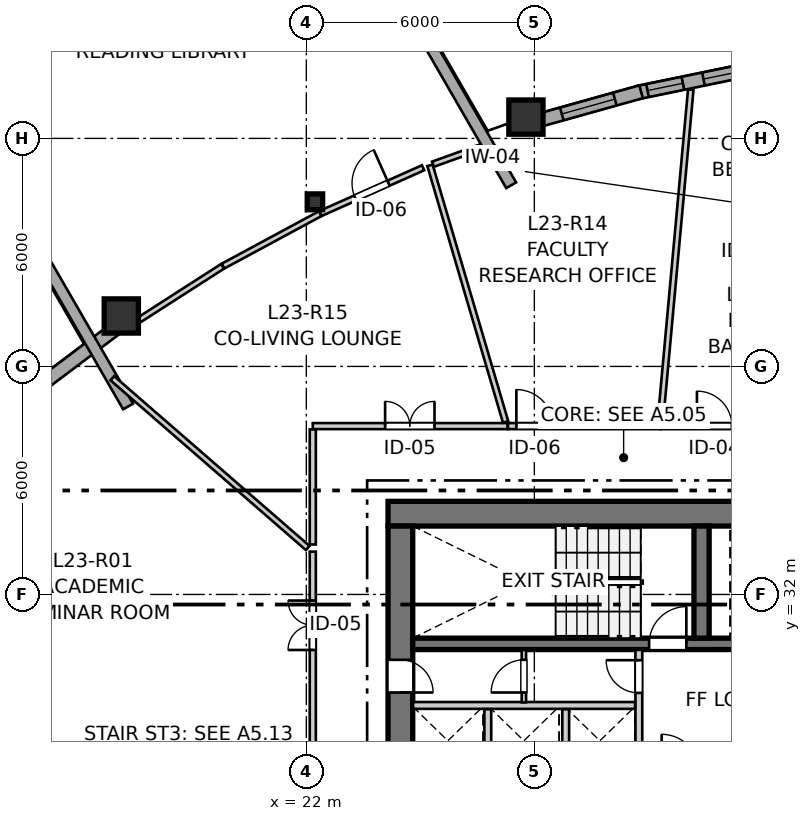
"""IFC4 building model, lengths in metres.
Left out: names, types, materials, properties, quantities, classifications, styles, units other than length and angle.
Written with IfcOpenShell. Run it as: python <this file> out.ifc"""

import sys

from ifc_helpers import new_model, si_unit, direction, frame, frame_2d, origin, origin_2d, place, context, subcontext, project, spatial, rectangle, i_section, extrude, source, transform, mapped, element, fill, save


model = new_model("IFC4")
c1 = context("Model", 3, precision=1e-05, world=origin(), true_north=direction((0.0, 1.0)))
c2 = subcontext(c1, "Body", "Model", "MODEL_VIEW")
j1 = project(units=[si_unit("LENGTHUNIT", "METRE"), si_unit("PLANEANGLEUNIT", "RADIAN")], contexts=[c1])
p1 = place(None, origin())
s1 = spatial("IfcSite", under=j1, at=p1, CompositionType="ELEMENT")
p2 = place(p1, origin())
s2 = spatial("IfcBuilding", under=s1, at=p2, CompositionType="ELEMENT")
p3 = place(p2, frame((0.0, 0.0, 80.0)))
s3 = spatial("IfcBuildingStorey", under=s2, at=p3, CompositionType="ELEMENT", Elevation=80.0)
p4 = place(p3, frame((36.55, 34.125, 0.0), z_axis=(0.0, 0.0, 1.0), x_axis=(-1.0, 0.0, 0.0)))
e1 = element("IfcWall", 1, at=p4, inside=s3, PredefinedType="SHEAR", context=c2, shape_type="SweptSolid", body=[
    extrude(rectangle(XDim=12.4, YDim=0.65, at=frame_2d((6.2, 0.0))), origin(), (0.0, 0.0, 1.0), 2.935),
])
p5 = place(p3, frame((24.475, 33.8, 0.0), z_axis=(0.0, 0.0, 1.0), x_axis=(0.0, -1.0, 0.0)))
e2 = element("IfcWall", 2, at=p5, inside=s3, PredefinedType="SHEAR", context=c2, shape_type="SweptSolid", body=[
    extrude(rectangle(XDim=15.6, YDim=0.65, at=frame_2d((7.8, 0.0))), origin(), (0.0, 0.0, 1.0), 2.935),
])
p6 = place(p5, frame((7.05, 0.0, 0.0)))
e3 = element("IfcOpeningElement", 3, at=p6, cuts=e2, PredefinedType="OPENING", context=c2, shape_type="SweptSolid", body=[
    extrude(rectangle(XDim=1.5, YDim=2.15, at=frame_2d((0.75, 1.075))), frame((0.0, 0.335, 0.0), z_axis=(0.0, -1.0, 0.0), x_axis=(1.0, 0.0, 0.0)), (0.0, 0.0, 1.0), 0.67),
])
p7 = place(p5, frame((3.52, 0.0, 0.0)))
e4 = element("IfcOpeningElement", 4, at=p7, cuts=e2, PredefinedType="OPENING", context=c2, shape_type="SweptSolid", body=[
    extrude(rectangle(XDim=0.86, YDim=2.05, at=frame_2d((0.43, 1.025))), frame((0.0, 0.335, 0.0), z_axis=(0.0, -1.0, 0.0), x_axis=(1.0, 0.0, 0.0)), (0.0, 0.0, 1.0), 0.67),
])
p8 = place(p5, frame((11.22, 0.0, 0.0)))
e5 = element("IfcOpeningElement", 5, at=p8, cuts=e2, PredefinedType="OPENING", context=c2, shape_type="SweptSolid", body=[
    extrude(rectangle(XDim=0.86, YDim=2.05, at=frame_2d((0.43, 1.025))), frame((0.0, 0.335, 0.0), z_axis=(0.0, -1.0, 0.0), x_axis=(1.0, 0.0, 0.0)), (0.0, 0.0, 1.0), 0.67),
])
p9 = place(p3, frame((24.8, 30.7, 0.0), z_axis=(0.0, 0.0, 1.0), x_axis=(1.0, 0.0, 0.0)))
e6 = element("IfcWall", 6, at=p9, inside=s3, PredefinedType="SHEAR", context=c2, shape_type="SweptSolid", body=[
    extrude(rectangle(XDim=11.1, YDim=0.3, at=frame_2d((5.55, 0.0))), origin(), (0.0, 0.0, 1.0), 2.935),
])
p10 = place(p9, frame((6.22, 0.0, 0.0)))
e7 = element("IfcOpeningElement", 7, at=p10, cuts=e6, PredefinedType="OPENING", context=c2, shape_type="SweptSolid", body=[
    extrude(rectangle(XDim=0.98, YDim=2.15, at=frame_2d((0.49, 1.075))), frame((0.0, 0.16, 0.0), z_axis=(0.0, -1.0, 0.0), x_axis=(1.0, 0.0, 0.0)), (0.0, 0.0, 1.0), 0.32),
])
p11 = place(p9, frame((9.15, 0.0, 0.0)))
e8 = element("IfcOpeningElement", 8, at=p11, cuts=e6, PredefinedType="OPENING", context=c2, shape_type="SweptSolid", body=[
    extrude(rectangle(XDim=1.15, YDim=2.15, at=frame_2d((0.575, 1.075))), frame((0.0, 0.16, 0.0), z_axis=(0.0, -1.0, 0.0), x_axis=(1.0, 0.0, 0.0)), (0.0, 0.0, 1.0), 0.32),
])
p12 = place(p3, frame((32.4, 30.85, 0.0), z_axis=(0.0, 0.0, 1.0), x_axis=(0.0, 1.0, 0.0)))
e9 = element("IfcWall", 9, at=p12, inside=s3, PredefinedType="SHEAR", context=c2, shape_type="SweptSolid", body=[
    extrude(rectangle(XDim=2.95, YDim=0.4, at=frame_2d((1.475, 0.0))), origin(), (0.0, 0.0, 1.0), 2.935),
])
m1 = source(origin(), c2, "Body", "SweptSolid", [
    extrude(rectangle(XDim=0.9, YDim=0.9, at=origin_2d()), origin(), (0.0, 0.0, 1.0), 2.935),
])
p13 = place(p3, frame((27.779, 44.561, 0.0), z_axis=(0.0, 0.0, 1.0), x_axis=(1.0, 0.0, 0.0)))
e10 = element("IfcColumn", 10, at=p13, inside=s3, PredefinedType="COLUMN", context=c2, shape_type="MappedRepresentation", body=[
    mapped(m1, transform((0.0, 0.0, 0.0), x_axis=(1.0, 0.0, 0.0), y_axis=(0.0, 1.0, 0.0), z_axis=(0.0, 0.0, 1.0), scale=1.0)),
])
m2 = source(origin(), c2, "Body", "SweptSolid", [
    extrude(i_section(OverallWidth=0.406, OverallDepth=0.416, WebThickness=0.027, FlangeThickness=0.044, FilletRadius=0.015, at=origin_2d()), origin(), (0.0, 0.0, 1.0), 2.935),
])
p14 = place(p3, frame((22.227, 42.331, 0.0), z_axis=(0.0, 0.0, 1.0), x_axis=(1.0, 0.0, 0.0)))
e11 = element("IfcColumn", 11, at=p14, inside=s3, PredefinedType="PILASTER", context=c2, shape_type="MappedRepresentation", body=[
    mapped(m2, transform((0.0, 0.0, 0.0), x_axis=(1.0, 0.0, 0.0), y_axis=(0.0, 1.0, 0.0), z_axis=(0.0, 0.0, 1.0), scale=1.0)),
])
p15 = place(p3, frame((17.131, 39.327, 0.0), z_axis=(0.0, 0.0, 1.0), x_axis=(1.0, 0.0, 0.0)))
e12 = element("IfcColumn", 12, at=p15, inside=s3, PredefinedType="COLUMN", context=c2, shape_type="MappedRepresentation", body=[
    mapped(m1, transform((0.0, 0.0, 0.0), x_axis=(1.0, 0.0, 0.0), y_axis=(0.0, 1.0, 0.0), z_axis=(0.0, 0.0, 1.0), scale=1.0)),
])
p16 = place(p3, frame((33.803, 45.84, 0.0), z_axis=(0.0, 0.0, 1.0), x_axis=(-0.97943222174, -0.201773444777, 0.0)))
e13 = element("IfcWall", 13, at=p16, inside=s3, PredefinedType="SOLIDWALL", context=c2, shape_type="SweptSolid", body=[
    extrude(rectangle(XDim=3.144, YDim=0.35, at=frame_2d((1.572, 0.0))), origin(), (0.0, 0.0, 1.0), 2.465),
])
p17 = place(p16, frame((0.431, 0.0, 0.82)))
e14 = element("IfcOpeningElement", 14, at=p17, cuts=e13, PredefinedType="OPENING", context=c2, shape_type="SweptSolid", body=[
    extrude(rectangle(XDim=0.95, YDim=1.35, at=frame_2d((0.475, 0.675))), frame((0.0, 0.185, 0.0), z_axis=(0.0, -1.0, 0.0), x_axis=(1.0, 0.0, 0.0)), (0.0, 0.0, 1.0), 0.37),
])
p18 = place(p16, frame((1.933, 0.0, 0.82)))
e15 = element("IfcOpeningElement", 15, at=p18, cuts=e13, PredefinedType="OPENING", context=c2, shape_type="SweptSolid", body=[
    extrude(rectangle(XDim=0.95, YDim=1.35, at=frame_2d((0.475, 0.675))), frame((0.0, 0.185, 0.0), z_axis=(0.0, -1.0, 0.0), x_axis=(1.0, 0.0, 0.0)), (0.0, 0.0, 1.0), 0.37),
])
p19 = place(p3, frame((30.809, 45.227, 0.0), z_axis=(0.0, 0.0, 1.0), x_axis=(-0.963041637143, -0.269352566591, 0.0)))
e16 = element("IfcWall", 16, at=p19, inside=s3, PredefinedType="SOLIDWALL", context=c2, shape_type="SweptSolid", body=[
    extrude(rectangle(XDim=2.873, YDim=0.35, at=frame_2d((1.437, 0.0))), origin(), (0.0, 0.0, 1.0), 2.465),
])
p20 = place(p19, frame((0.717, 0.0, 0.82)))
e17 = element("IfcOpeningElement", 17, at=p20, cuts=e16, PredefinedType="OPENING", context=c2, shape_type="SweptSolid", body=[
    extrude(rectangle(XDim=1.45, YDim=1.25, at=frame_2d((0.725, 0.625))), frame((0.0, 0.185, 0.0), z_axis=(0.0, -1.0, 0.0), x_axis=(1.0, 0.0, 0.0)), (0.0, 0.0, 1.0), 0.37),
])
p21 = place(p3, frame((17.057, 39.052, 0.0), z_axis=(0.0, 0.0, 1.0), x_axis=(-0.798379678642, -0.602154372841, 0.0)))
e18 = element("IfcWall", 18, at=p21, inside=s3, PredefinedType="SOLIDWALL", context=c2, shape_type="SweptSolid", body=[
    extrude(rectangle(XDim=2.79, YDim=0.35, at=frame_2d((1.395, 0.0))), origin(), (0.0, 0.0, 1.0), 2.465),
])
for number, where, z_axis, x_axis in (
    (19, (17.31, 36.946, 0.0), (0.0, 0.0, 1.0), (-0.5, 0.866, 0.0)),
    (20, (27.39, 42.766, 0.0), (0.0, 0.0, 1.0), (-0.5, 0.866, 0.0)),
):
    element("IfcWall", number, at=place(p3, frame(where, z_axis=z_axis, x_axis=x_axis)), inside=s3, PredefinedType="SOLIDWALL", context=c2, shape_type="SweptSolid", body=[
        extrude(rectangle(XDim=20.603, YDim=0.3, at=frame_2d((10.302, 0.0))), origin(), (0.0, 0.0, 1.0), 2.115),
    ])
p22 = place(p3, frame((30.75, 27.43, 0.0), z_axis=(0.0, 0.0, 1.0), x_axis=(0.0, 1.0, 0.0)))
e21 = element("IfcWall", 21, at=p22, inside=s3, PredefinedType="PARTITIONING", context=c2, shape_type="SweptSolid", body=[
    extrude(rectangle(XDim=3.11, YDim=0.18, at=frame_2d((1.555, 0.0))), origin(), (0.0, 0.0, 1.0), 2.935),
])
p23 = place(p22, frame((1.98, 0.0, 0.0)))
e22 = element("IfcOpeningElement", 22, at=p23, cuts=e21, PredefinedType="OPENING", context=c2, shape_type="SweptSolid", body=[
    extrude(rectangle(XDim=0.86, YDim=2.05, at=frame_2d((0.43, 1.025))), frame((0.0, 0.1, 0.0), z_axis=(0.0, -1.0, 0.0), x_axis=(1.0, 0.0, 0.0)), (0.0, 0.0, 1.0), 0.2),
])
p24 = place(p3, frame((24.81, 29.08, 0.0), z_axis=(0.0, 0.0, 1.0), x_axis=(1.0, 0.0, 0.0)))
e23 = element("IfcWall", 23, at=p24, inside=s3, PredefinedType="PARTITIONING", context=c2, shape_type="SweptSolid", body=[
    extrude(rectangle(XDim=5.84, YDim=0.18, at=frame_2d((2.92, 0.0))), origin(), (0.0, 0.0, 1.0), 2.935),
])
for number, where, z_axis, x_axis in (
    (24, (26.775, 27.2, 0.0), (0.0, 0.0, 1.0), (0.0, 1.0, 0.0)),
    (25, (28.825, 27.2, 0.0), (0.0, 0.0, 1.0), (0.0, 1.0, 0.0)),
):
    element("IfcWall", number, at=place(p3, frame(where, z_axis=z_axis, x_axis=x_axis)), inside=s3, PredefinedType="PARTITIONING", context=c2, shape_type="SweptSolid", body=[
        extrude(rectangle(XDim=1.78, YDim=0.18, at=frame_2d((0.89, 0.0))), origin(), (0.0, 0.0, 1.0), 2.935),
    ])
p25 = place(p3, frame((27.725, 29.16, 0.0), z_axis=(0.0, 0.0, 1.0), x_axis=(0.0, 1.0, 0.0)))
e26 = element("IfcWall", 26, at=p25, inside=s3, PredefinedType="PARTITIONING", context=c2, shape_type="SweptSolid", body=[
    extrude(rectangle(XDim=1.38, YDim=0.115, at=frame_2d((0.69, 0.0))), origin(), (0.0, 0.0, 1.0), 2.935),
])
p26 = place(p25, frame((0.26, 0.0, 0.0)))
e27 = element("IfcOpeningElement", 27, at=p26, cuts=e26, PredefinedType="OPENING", context=c2, shape_type="SweptSolid", body=[
    extrude(rectangle(XDim=0.86, YDim=2.05, at=frame_2d((0.43, 1.025))), frame((0.0, 0.067, 0.0), z_axis=(0.0, -1.0, 0.0), x_axis=(1.0, 0.0, 0.0)), (0.0, 0.0, 1.0), 0.135),
])
p27 = place(p3, frame((22.17, 27.85, 0.0), z_axis=(0.0, 0.0, 1.0), x_axis=(0.0, 1.0, 0.0)))
e28 = element("IfcWall", 28, at=p27, inside=s3, PredefinedType="PARTITIONING", context=c2, shape_type="SweptSolid", body=[
    extrude(rectangle(XDim=5.276, YDim=0.16, at=frame_2d((2.638, 0.0))), origin(), (0.0, 0.0, 1.0), 2.935),
])
p28 = place(p27, frame((2.689, 0.0, 0.0)))
e29 = element("IfcOpeningElement", 29, at=p28, cuts=e28, PredefinedType="OPENING", context=c2, shape_type="SweptSolid", body=[
    extrude(rectangle(XDim=1.3, YDim=2.1, at=frame_2d((0.65, 1.05))), frame((0.0, 0.09, 0.0), z_axis=(0.0, -1.0, 0.0), x_axis=(1.0, 0.0, 0.0)), (0.0, 0.0, 1.0), 0.18),
])
p29 = place(p3, frame((22.17, 36.43, 0.0), z_axis=(0.0, 0.0, 1.0), x_axis=(1.0, 0.0, 0.0)))
e30 = element("IfcWall", 30, at=p29, inside=s3, PredefinedType="PARTITIONING", context=c2, shape_type="SweptSolid", body=[
    extrude(rectangle(XDim=5.122, YDim=0.16, at=frame_2d((2.561, 0.0))), origin(), (0.0, 0.0, 1.0), 2.573),
])
p30 = place(p29, frame((1.903, 0.0, 0.0)))
e31 = element("IfcOpeningElement", 31, at=p30, cuts=e30, PredefinedType="OPENING", context=c2, shape_type="SweptSolid", body=[
    extrude(rectangle(XDim=1.3, YDim=2.1, at=frame_2d((0.65, 1.05))), frame((0.0, 0.09, 0.0), z_axis=(0.0, -1.0, 0.0), x_axis=(1.0, 0.0, 0.0)), (0.0, 0.0, 1.0), 0.18),
])
p31 = place(p3, frame((27.307, 36.43, 0.0), z_axis=(0.0, 0.0, 1.0), x_axis=(1.0, 0.0, 0.0)))
e32 = element("IfcWall", 32, at=p31, inside=s3, PredefinedType="PARTITIONING", context=c2, shape_type="SweptSolid", body=[
    extrude(rectangle(XDim=4.013, YDim=0.16, at=frame_2d((2.007, 0.0))), origin(), (0.0, 0.0, 1.0), 2.935),
])
p32 = place(p31, frame((0.22, 0.0, 0.0)))
e33 = element("IfcOpeningElement", 33, at=p32, cuts=e32, PredefinedType="OPENING", context=c2, shape_type="SweptSolid", body=[
    extrude(rectangle(XDim=0.96, YDim=2.1, at=frame_2d((0.48, 1.05))), frame((0.0, 0.09, 0.0), z_axis=(0.0, -1.0, 0.0), x_axis=(1.0, 0.0, 0.0)), (0.0, 0.0, 1.0), 0.18),
])
p33 = place(p3, frame((22.377, 42.026, 0.0), z_axis=(0.0, 0.0, 1.0), x_axis=(0.913387960111, 0.407090204162, 0.0)))
e34 = element("IfcWall", 34, at=p33, inside=s3, PredefinedType="PARTITIONING", context=c2, shape_type="SweptSolid", body=[
    extrude(rectangle(XDim=2.951, YDim=0.145, at=frame_2d((1.475, 0.0))), origin(), (0.0, 0.0, 1.0), 2.453),
])
p34 = place(p33, frame((0.995, 0.0, 0.0)))
e35 = element("IfcOpeningElement", 35, at=p34, cuts=e34, PredefinedType="OPENING", context=c2, shape_type="SweptSolid", body=[
    extrude(rectangle(XDim=0.96, YDim=2.1, at=frame_2d((0.48, 1.05))), frame((0.0, 0.083, 0.0), z_axis=(0.0, -1.0, 0.0), x_axis=(1.0, 0.0, 0.0)), (0.0, 0.0, 1.0), 0.165),
])
p35 = place(p3, frame((31.335, 36.43, 0.0), z_axis=(0.0, 0.0, 1.0), x_axis=(1.0, 0.0, 0.0)))
e36 = element("IfcWall", 36, at=p35, inside=s3, PredefinedType="PARTITIONING", context=c2, shape_type="SweptSolid", body=[
    extrude(rectangle(XDim=2.806, YDim=0.16, at=frame_2d((1.403, 0.0))), origin(), (0.0, 0.0, 1.0), 2.935),
])
p36 = place(p35, frame((0.944, 0.0, 0.0)))
e37 = element("IfcOpeningElement", 37, at=p36, cuts=e36, PredefinedType="OPENING", context=c2, shape_type="SweptSolid", body=[
    extrude(rectangle(XDim=0.92, YDim=2.1, at=frame_2d((0.46, 1.05))), frame((0.0, 0.09, 0.0), z_axis=(0.0, -1.0, 0.0), x_axis=(1.0, 0.0, 0.0)), (0.0, 0.0, 1.0), 0.18),
])
p37 = place(p3, frame((31.314, 36.525, 0.0), z_axis=(0.0, 0.0, 1.0), x_axis=(0.091226381691, 0.995830179942, 0.0)))
e38 = element("IfcWall", 38, at=p37, inside=s3, PredefinedType="PARTITIONING", context=c2, shape_type="SweptSolid", body=[
    extrude(rectangle(XDim=8.797, YDim=0.145, at=frame_2d((4.398, 0.0))), origin(), (0.0, 0.0, 1.0), 2.935),
])
p38 = place(p3, frame((16.895, 37.69, 0.0), z_axis=(0.0, 0.0, 1.0), x_axis=(0.754854710059, -0.655892038907, 0.0)))
e39 = element("IfcWall", 39, at=p38, inside=s3, PredefinedType="PARTITIONING", context=c2, shape_type="SweptSolid", body=[
    extrude(rectangle(XDim=6.811, YDim=0.145, at=frame_2d((3.406, 0.0))), origin(), (0.0, 0.0, 1.0), 2.103),
])
p39 = place(p3, frame((25.254, 43.292, 0.0), z_axis=(0.0, 0.0, 1.0), x_axis=(0.282661880608, -0.959219610543, 0.0)))
e40 = element("IfcWall", 40, at=p39, inside=s3, PredefinedType="PARTITIONING", context=c2, shape_type="SweptSolid", body=[
    extrude(rectangle(XDim=7.041, YDim=0.145, at=frame_2d((3.521, 0.0))), origin(), (0.0, 0.0, 1.0), 2.935),
])
p40 = place(p3, frame((22.17, 33.315, 0.0), z_axis=(0.0, 0.0, 1.0), x_axis=(0.0, 1.0, 0.0)))
e41 = element("IfcWall", 41, at=p40, inside=s3, PredefinedType="PARTITIONING", context=c2, shape_type="SweptSolid", body=[
    extrude(rectangle(XDim=3.027, YDim=0.16, at=frame_2d((1.514, 0.0))), origin(), (0.0, 0.0, 1.0), 2.935),
])
p41 = place(p3, frame((17.326, 39.048, 0.0), z_axis=(0.0, 0.0, 1.0), x_axis=(0.841527071554, 0.540214945963, 0.0)))
e42 = element("IfcWall", 42, at=p41, inside=s3, PredefinedType="PARTITIONING", context=c2, shape_type="SweptSolid", body=[
    extrude(rectangle(XDim=2.934, YDim=0.145, at=frame_2d((1.467, 0.0))), origin(), (0.0, 0.0, 1.0), 2.453),
])
p42 = place(p3, frame((19.808, 40.64, 0.0), z_axis=(0.0, 0.0, 1.0), x_axis=(0.880106382364, 0.474776532404, 0.0)))
e43 = element("IfcWall", 43, at=p42, inside=s3, PredefinedType="PARTITIONING", context=c2, shape_type="SweptSolid", body=[
    extrude(rectangle(XDim=2.904, YDim=0.145, at=frame_2d((1.452, 0.0))), origin(), (0.0, 0.0, 1.0), 2.453),
])
p43 = place(p3, frame((25.334, 43.321, 0.0), z_axis=(0.0, 0.0, 1.0), x_axis=(0.940956330278, 0.3385279671, 0.0)))
e44 = element("IfcWall", 44, at=p43, inside=s3, PredefinedType="PARTITIONING", context=c2, shape_type="SweptSolid", body=[
    extrude(rectangle(XDim=1.354, YDim=0.145, at=frame_2d((0.677, 0.0))), origin(), (0.0, 0.0, 1.0), 2.453),
])
m3 = source(origin(), c2, "Body", "SweptSolid", [
    extrude(rectangle(XDim=0.95, YDim=1.35, at=frame_2d((0.475, 0.675))), frame((0.0, 0.03, 0.0), z_axis=(0.0, -1.0, 0.0), x_axis=(1.0, 0.0, 0.0)), (0.0, 0.0, 1.0), 0.06),
])
p44 = place(p17, origin())
e45 = element("IfcWindow", 45, at=p44, inside=s3, PartitioningType="SINGLE_PANEL", PredefinedType="WINDOW", context=c2, shape_type="MappedRepresentation", body=[
    mapped(m3, transform((0.0, 0.0, 0.0), x_axis=(1.0, 0.0, 0.0), y_axis=(0.0, 1.0, 0.0), z_axis=(0.0, 0.0, 1.0), scale=1.0)),
])
fill(e14, e45)
p45 = place(p18, origin())
e46 = element("IfcWindow", 46, at=p45, inside=s3, PartitioningType="SINGLE_PANEL", PredefinedType="WINDOW", context=c2, shape_type="MappedRepresentation", body=[
    mapped(m3, transform((0.0, 0.0, 0.0), x_axis=(1.0, 0.0, 0.0), y_axis=(0.0, 1.0, 0.0), z_axis=(0.0, 0.0, 1.0), scale=1.0)),
])
fill(e15, e46)
m4 = source(origin(), c2, "Body", "SweptSolid", [
    extrude(rectangle(XDim=1.45, YDim=1.25, at=frame_2d((0.725, 0.625))), frame((0.0, 0.03, 0.0), z_axis=(0.0, -1.0, 0.0), x_axis=(1.0, 0.0, 0.0)), (0.0, 0.0, 1.0), 0.06),
])
p46 = place(p20, origin())
e47 = element("IfcWindow", 47, at=p46, inside=s3, PartitioningType="SINGLE_PANEL", PredefinedType="WINDOW", context=c2, shape_type="MappedRepresentation", body=[
    mapped(m4, transform((0.0, 0.0, 0.0), x_axis=(1.0, 0.0, 0.0), y_axis=(0.0, 1.0, 0.0), z_axis=(0.0, 0.0, 1.0), scale=1.0)),
])
fill(e17, e47)
m5 = source(origin(), c2, "Body", "SweptSolid", [
    extrude(rectangle(XDim=0.98, YDim=2.15, at=frame_2d((0.49, 1.075))), frame((0.0, 0.025, 0.0), z_axis=(0.0, -1.0, 0.0), x_axis=(1.0, 0.0, 0.0)), (0.0, 0.0, 1.0), 0.05),
])
p47 = place(p10, origin())
e48 = element("IfcDoor", 48, at=p47, inside=s3, OperationType="SINGLE_SWING_RIGHT", PredefinedType="DOOR", context=c2, shape_type="MappedRepresentation", body=[
    mapped(m5, transform((0.0, 0.0, 0.0), x_axis=(1.0, 0.0, 0.0), y_axis=(0.0, 1.0, 0.0), z_axis=(0.0, 0.0, 1.0), scale=1.0)),
])
fill(e7, e48)
m6 = source(origin(), c2, "Body", "SweptSolid", [
    extrude(rectangle(XDim=0.86, YDim=2.05, at=frame_2d((0.43, 1.025))), frame((0.0, 0.025, 0.0), z_axis=(0.0, -1.0, 0.0), x_axis=(1.0, 0.0, 0.0)), (0.0, 0.0, 1.0), 0.05),
])
p48 = place(p7, origin())
e49 = element("IfcDoor", 49, at=p48, inside=s3, OperationType="SINGLE_SWING_RIGHT", PredefinedType="DOOR", context=c2, shape_type="MappedRepresentation", body=[
    mapped(m6, transform((0.0, 0.0, 0.0), x_axis=(1.0, 0.0, 0.0), y_axis=(0.0, 1.0, 0.0), z_axis=(0.0, 0.0, 1.0), scale=1.0)),
])
fill(e4, e49)
p49 = place(p23, origin())
e50 = element("IfcDoor", 50, at=p49, inside=s3, OperationType="SINGLE_SWING_RIGHT", PredefinedType="DOOR", context=c2, shape_type="MappedRepresentation", body=[
    mapped(m6, transform((0.0, 0.0, 0.0), x_axis=(1.0, 0.0, 0.0), y_axis=(0.0, 1.0, 0.0), z_axis=(0.0, 0.0, 1.0), scale=1.0)),
])
fill(e22, e50)
p50 = place(p26, origin())
e51 = element("IfcDoor", 51, at=p50, inside=s3, OperationType="SINGLE_SWING_LEFT", PredefinedType="DOOR", context=c2, shape_type="MappedRepresentation", body=[
    mapped(m6, transform((0.0, 0.0, 0.0), x_axis=(1.0, 0.0, 0.0), y_axis=(0.0, 1.0, 0.0), z_axis=(0.0, 0.0, 1.0), scale=1.0)),
])
fill(e27, e51)
m7 = source(origin(), c2, "Body", "SweptSolid", [
    extrude(rectangle(XDim=1.3, YDim=2.1, at=frame_2d((0.65, 1.05))), frame((0.0, 0.025, 0.0), z_axis=(0.0, -1.0, 0.0), x_axis=(1.0, 0.0, 0.0)), (0.0, 0.0, 1.0), 0.05),
])
p51 = place(p28, origin())
e52 = element("IfcDoor", 52, at=p51, inside=s3, OperationType="DOUBLE_DOOR_SINGLE_SWING", PredefinedType="DOOR", context=c2, shape_type="MappedRepresentation", body=[
    mapped(m7, transform((0.0, 0.0, 0.0), x_axis=(1.0, 0.0, 0.0), y_axis=(0.0, 1.0, 0.0), z_axis=(0.0, 0.0, 1.0), scale=1.0)),
])
fill(e29, e52)
p52 = place(p30, origin())
e53 = element("IfcDoor", 53, at=p52, inside=s3, OperationType="DOUBLE_DOOR_SINGLE_SWING", PredefinedType="DOOR", context=c2, shape_type="MappedRepresentation", body=[
    mapped(m7, transform((0.0, 0.0, 0.0), x_axis=(1.0, 0.0, 0.0), y_axis=(0.0, 1.0, 0.0), z_axis=(0.0, 0.0, 1.0), scale=1.0)),
])
fill(e31, e53)
m8 = source(origin(), c2, "Body", "SweptSolid", [
    extrude(rectangle(XDim=0.96, YDim=2.1, at=frame_2d((0.48, 1.05))), frame((0.0, 0.025, 0.0), z_axis=(0.0, -1.0, 0.0), x_axis=(1.0, 0.0, 0.0)), (0.0, 0.0, 1.0), 0.05),
])
p53 = place(p32, origin())
e54 = element("IfcDoor", 54, at=p53, inside=s3, OperationType="SINGLE_SWING_LEFT", PredefinedType="DOOR", context=c2, shape_type="MappedRepresentation", body=[
    mapped(m8, transform((0.0, 0.0, 0.0), x_axis=(1.0, 0.0, 0.0), y_axis=(0.0, 1.0, 0.0), z_axis=(0.0, 0.0, 1.0), scale=1.0)),
])
fill(e33, e54)
p54 = place(p34, origin())
e55 = element("IfcDoor", 55, at=p54, inside=s3, OperationType="SINGLE_SWING_RIGHT", PredefinedType="DOOR", context=c2, shape_type="MappedRepresentation", body=[
    mapped(m8, transform((0.0, 0.0, 0.0), x_axis=(1.0, 0.0, 0.0), y_axis=(0.0, 1.0, 0.0), z_axis=(0.0, 0.0, 1.0), scale=1.0)),
])
fill(e35, e55)
m9 = source(origin(), c2, "Body", "SweptSolid", [
    extrude(rectangle(XDim=0.92, YDim=2.1, at=frame_2d((0.46, 1.05))), frame((0.0, 0.025, 0.0), z_axis=(0.0, -1.0, 0.0), x_axis=(1.0, 0.0, 0.0)), (0.0, 0.0, 1.0), 0.05),
])
p55 = place(p36, origin())
e56 = element("IfcDoor", 56, at=p55, inside=s3, OperationType="SINGLE_SWING_LEFT", PredefinedType="DOOR", context=c2, shape_type="MappedRepresentation", body=[
    mapped(m9, transform((0.0, 0.0, 0.0), x_axis=(1.0, 0.0, 0.0), y_axis=(0.0, 1.0, 0.0), z_axis=(0.0, 0.0, 1.0), scale=1.0)),
])
fill(e37, e56)
save(model, sys.argv[1])
